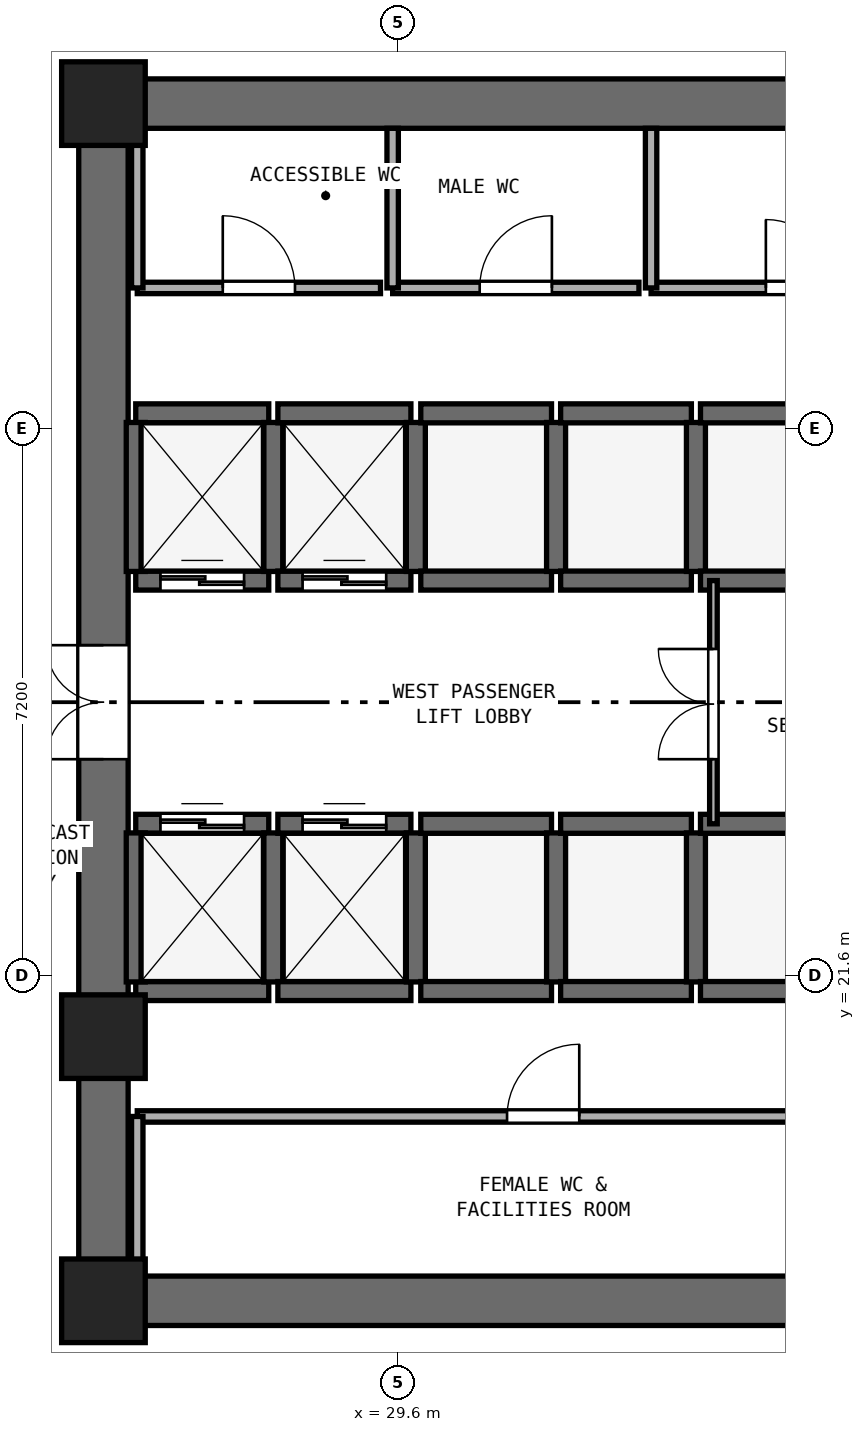
"""IFC4 building model, lengths in metres.
Left out: names, types, materials, properties, quantities, classifications, styles, units other than length and angle.
Written with IfcOpenShell. Run it as: python <this file> out.ifc"""

import sys

from ifc_helpers import new_model, si_unit, direction, frame, frame_2d, origin, origin_2d, place, context, subcontext, project, spatial, rectangle, extrude, element, fill, save


model = new_model("IFC4")
c1 = context("Model", 3, precision=1e-05, world=origin(), true_north=direction((0.0, 1.0)))
c2 = subcontext(c1, "Body", "Model", "MODEL_VIEW")
j1 = project(units=[si_unit("LENGTHUNIT", "METRE"), si_unit("PLANEANGLEUNIT", "RADIAN")], contexts=[c1])
p1 = place(None, origin())
s1 = spatial("IfcSite", under=j1, at=p1, CompositionType="ELEMENT")
p2 = place(p1, origin())
s2 = spatial("IfcBuilding", under=s1, at=p2, CompositionType="ELEMENT")
p3 = place(p2, frame((0.0, 0.0, 104.8)))
s3 = spatial("IfcBuildingStorey", under=s2, at=p3, CompositionType="ELEMENT", Elevation=104.8)
for number, where, z_axis, x_axis in (
    (1, (25.4, 17.325, 0.0), (0.0, 0.0, 1.0), (1.0, 0.0, 0.0)),
    (2, (25.4, 33.075, 0.0), (0.0, 0.0, 1.0), (1.0, 0.0, 0.0)),
):
    element("IfcWall", number, at=place(p3, frame(where, z_axis=z_axis, x_axis=x_axis)), inside=s3, PredefinedType="SHEAR", context=c2, shape_type="SweptSolid", body=[
        extrude(rectangle(XDim=23.2, YDim=0.65, at=frame_2d((11.6, 0.0))), origin(), (0.0, 0.0, 1.0), 3.525),
    ])
p4 = place(p3, frame((25.725, 17.65, 0.0), z_axis=(0.0, 0.0, 1.0), x_axis=(0.0, 1.0, 0.0)))
e3 = element("IfcWall", 3, at=p4, inside=s3, PredefinedType="SHEAR", context=c2, shape_type="SweptSolid", body=[
    extrude(rectangle(XDim=15.1, YDim=0.65, at=frame_2d((7.55, 0.0))), origin(), (0.0, 0.0, 1.0), 3.525),
])
p5 = place(p4, frame((6.8, 0.0, 0.0)))
e4 = element("IfcOpeningElement", 4, at=p5, cuts=e3, PredefinedType="OPENING", context=c2, shape_type="SweptSolid", body=[
    extrude(rectangle(XDim=1.5, YDim=2.15, at=frame_2d((0.75, 1.075))), frame((0.0, 0.335, 0.0), z_axis=(0.0, -1.0, 0.0), x_axis=(1.0, 0.0, 0.0)), (0.0, 0.0, 1.0), 0.67),
])
for number, where, z_axis, x_axis in (
    (5, (25.725, 17.325, 0.0), (0.0, 0.0, 1.0), (1.0, 0.0, 0.0)),
    (6, (25.725, 33.075, 0.0), (0.0, 0.0, 1.0), (1.0, 0.0, 0.0)),
    (7, (25.725, 20.8, 0.0), (0.0, 0.0, 1.0), (1.0, 0.0, 0.0)),
):
    element("IfcColumn", number, at=place(p3, frame(where, z_axis=z_axis, x_axis=x_axis)), inside=s3, PredefinedType="PILASTER", context=c2, shape_type="SweptSolid", body=[
        extrude(rectangle(XDim=1.1, YDim=1.1, at=origin_2d()), origin(), (0.0, 0.0, 1.0), 3.8),
    ])
p6 = place(p3, frame((26.15, 26.8, 0.0), z_axis=(0.0, 0.0, 1.0), x_axis=(1.0, 0.0, 0.0)))
e8 = element("IfcWall", 8, at=p6, inside=s3, PredefinedType="SHEAR", context=c2, shape_type="SweptSolid", body=[
    extrude(rectangle(XDim=1.75, YDim=0.25, at=frame_2d((0.875, 0.0))), origin(), (0.0, 0.0, 1.0), 3.525),
])
p7 = place(p6, frame((0.325, 0.0, 0.0)))
e9 = element("IfcOpeningElement", 9, at=p7, cuts=e8, PredefinedType="OPENING", context=c2, shape_type="SweptSolid", body=[
    extrude(rectangle(XDim=1.1, YDim=2.15, at=frame_2d((0.55, 1.075))), frame((0.0, 0.135, 0.0), z_axis=(0.0, -1.0, 0.0), x_axis=(1.0, 0.0, 0.0)), (0.0, 0.0, 1.0), 0.27),
])
p8 = place(p3, frame((26.15, 29.0, 0.0), z_axis=(0.0, 0.0, 1.0), x_axis=(1.0, 0.0, 0.0)))
e10 = element("IfcWall", 10, at=p8, inside=s3, PredefinedType="SHEAR", context=c2, shape_type="SweptSolid", body=[
    extrude(rectangle(XDim=1.75, YDim=0.25, at=frame_2d((0.875, 0.0))), origin(), (0.0, 0.0, 1.0), 3.525),
])
for number, where, z_axis, x_axis in (
    (11, (26.15, 26.92, 0.0), (0.0, 0.0, 1.0), (0.0, 1.0, 0.0)),
    (12, (27.96, 26.92, 0.0), (0.0, 0.0, 1.0), (0.0, 1.0, 0.0)),
):
    element("IfcWall", number, at=place(p3, frame(where, z_axis=z_axis, x_axis=x_axis)), inside=s3, PredefinedType="SHEAR", context=c2, shape_type="SweptSolid", body=[
        extrude(rectangle(XDim=1.96, YDim=0.25, at=frame_2d((0.98, 0.0))), origin(), (0.0, 0.0, 1.0), 3.525),
    ])
p9 = place(p3, frame((28.02, 26.8, 0.0), z_axis=(0.0, 0.0, 1.0), x_axis=(1.0, 0.0, 0.0)))
e13 = element("IfcWall", 13, at=p9, inside=s3, PredefinedType="SHEAR", context=c2, shape_type="SweptSolid", body=[
    extrude(rectangle(XDim=1.75, YDim=0.25, at=frame_2d((0.875, 0.0))), origin(), (0.0, 0.0, 1.0), 3.525),
])
p10 = place(p9, frame((0.325, 0.0, 0.0)))
e14 = element("IfcOpeningElement", 14, at=p10, cuts=e13, PredefinedType="OPENING", context=c2, shape_type="SweptSolid", body=[
    extrude(rectangle(XDim=1.1, YDim=2.15, at=frame_2d((0.55, 1.075))), frame((0.0, 0.135, 0.0), z_axis=(0.0, -1.0, 0.0), x_axis=(1.0, 0.0, 0.0)), (0.0, 0.0, 1.0), 0.27),
])
p11 = place(p3, frame((28.02, 29.0, 0.0), z_axis=(0.0, 0.0, 1.0), x_axis=(1.0, 0.0, 0.0)))
e15 = element("IfcWall", 15, at=p11, inside=s3, PredefinedType="SHEAR", context=c2, shape_type="SweptSolid", body=[
    extrude(rectangle(XDim=1.75, YDim=0.25, at=frame_2d((0.875, 0.0))), origin(), (0.0, 0.0, 1.0), 3.525),
])
p12 = place(p3, frame((29.835, 26.92, 0.0), z_axis=(0.0, 0.0, 1.0), x_axis=(0.0, 1.0, 0.0)))
e16 = element("IfcWall", 16, at=p12, inside=s3, PredefinedType="SHEAR", context=c2, shape_type="SweptSolid", body=[
    extrude(rectangle(XDim=1.96, YDim=0.25, at=frame_2d((0.98, 0.0))), origin(), (0.0, 0.0, 1.0), 3.525),
])
p13 = place(p3, frame((26.15, 21.4, 0.0), z_axis=(0.0, 0.0, 1.0), x_axis=(1.0, 0.0, 0.0)))
e17 = element("IfcWall", 17, at=p13, inside=s3, PredefinedType="SHEAR", context=c2, shape_type="SweptSolid", body=[
    extrude(rectangle(XDim=1.75, YDim=0.25, at=frame_2d((0.875, 0.0))), origin(), (0.0, 0.0, 1.0), 3.525),
])
p14 = place(p3, frame((26.15, 23.6, 0.0), z_axis=(0.0, 0.0, 1.0), x_axis=(1.0, 0.0, 0.0)))
e18 = element("IfcWall", 18, at=p14, inside=s3, PredefinedType="SHEAR", context=c2, shape_type="SweptSolid", body=[
    extrude(rectangle(XDim=1.75, YDim=0.25, at=frame_2d((0.875, 0.0))), origin(), (0.0, 0.0, 1.0), 3.525),
])
p15 = place(p14, frame((0.325, 0.0, 0.0)))
e19 = element("IfcOpeningElement", 19, at=p15, cuts=e18, PredefinedType="OPENING", context=c2, shape_type="SweptSolid", body=[
    extrude(rectangle(XDim=1.1, YDim=2.15, at=frame_2d((0.55, 1.075))), frame((0.0, 0.135, 0.0), z_axis=(0.0, -1.0, 0.0), x_axis=(1.0, 0.0, 0.0)), (0.0, 0.0, 1.0), 0.27),
])
for number, where, z_axis, x_axis in (
    (20, (26.15, 21.52, 0.0), (0.0, 0.0, 1.0), (0.0, 1.0, 0.0)),
    (21, (27.96, 21.52, 0.0), (0.0, 0.0, 1.0), (0.0, 1.0, 0.0)),
):
    element("IfcWall", number, at=place(p3, frame(where, z_axis=z_axis, x_axis=x_axis)), inside=s3, PredefinedType="SHEAR", context=c2, shape_type="SweptSolid", body=[
        extrude(rectangle(XDim=1.96, YDim=0.25, at=frame_2d((0.98, 0.0))), origin(), (0.0, 0.0, 1.0), 3.525),
    ])
p16 = place(p3, frame((28.02, 21.4, 0.0), z_axis=(0.0, 0.0, 1.0), x_axis=(1.0, 0.0, 0.0)))
e22 = element("IfcWall", 22, at=p16, inside=s3, PredefinedType="SHEAR", context=c2, shape_type="SweptSolid", body=[
    extrude(rectangle(XDim=1.75, YDim=0.25, at=frame_2d((0.875, 0.0))), origin(), (0.0, 0.0, 1.0), 3.525),
])
p17 = place(p3, frame((28.02, 23.6, 0.0), z_axis=(0.0, 0.0, 1.0), x_axis=(1.0, 0.0, 0.0)))
e23 = element("IfcWall", 23, at=p17, inside=s3, PredefinedType="SHEAR", context=c2, shape_type="SweptSolid", body=[
    extrude(rectangle(XDim=1.75, YDim=0.25, at=frame_2d((0.875, 0.0))), origin(), (0.0, 0.0, 1.0), 3.525),
])
p18 = place(p17, frame((0.325, 0.0, 0.0)))
e24 = element("IfcOpeningElement", 24, at=p18, cuts=e23, PredefinedType="OPENING", context=c2, shape_type="SweptSolid", body=[
    extrude(rectangle(XDim=1.1, YDim=2.15, at=frame_2d((0.55, 1.075))), frame((0.0, 0.135, 0.0), z_axis=(0.0, -1.0, 0.0), x_axis=(1.0, 0.0, 0.0)), (0.0, 0.0, 1.0), 0.27),
])
p19 = place(p3, frame((29.835, 21.52, 0.0), z_axis=(0.0, 0.0, 1.0), x_axis=(0.0, 1.0, 0.0)))
e25 = element("IfcWall", 25, at=p19, inside=s3, PredefinedType="SHEAR", context=c2, shape_type="SweptSolid", body=[
    extrude(rectangle(XDim=1.96, YDim=0.25, at=frame_2d((0.98, 0.0))), origin(), (0.0, 0.0, 1.0), 3.525),
])
for number, where, z_axis, x_axis in (
    (26, (29.9, 21.4, 0.0), (0.0, 0.0, 1.0), (1.0, 0.0, 0.0)),
    (27, (29.9, 23.6, 0.0), (0.0, 0.0, 1.0), (1.0, 0.0, 0.0)),
):
    element("IfcWall", number, at=place(p3, frame(where, z_axis=z_axis, x_axis=x_axis)), inside=s3, PredefinedType="SHEAR", context=c2, shape_type="SweptSolid", body=[
        extrude(rectangle(XDim=1.72, YDim=0.25, at=frame_2d((0.86, 0.0))), origin(), (0.0, 0.0, 1.0), 3.525),
    ])
p20 = place(p3, frame((31.68, 21.52, 0.0), z_axis=(0.0, 0.0, 1.0), x_axis=(0.0, 1.0, 0.0)))
e28 = element("IfcWall", 28, at=p20, inside=s3, PredefinedType="SHEAR", context=c2, shape_type="SweptSolid", body=[
    extrude(rectangle(XDim=1.96, YDim=0.25, at=frame_2d((0.98, 0.0))), origin(), (0.0, 0.0, 1.0), 3.525),
])
for number, where, z_axis, x_axis in (
    (29, (31.74, 21.4, 0.0), (0.0, 0.0, 1.0), (1.0, 0.0, 0.0)),
    (30, (31.74, 23.6, 0.0), (0.0, 0.0, 1.0), (1.0, 0.0, 0.0)),
):
    element("IfcWall", number, at=place(p3, frame(where, z_axis=z_axis, x_axis=x_axis)), inside=s3, PredefinedType="SHEAR", context=c2, shape_type="SweptSolid", body=[
        extrude(rectangle(XDim=1.72, YDim=0.25, at=frame_2d((0.86, 0.0))), origin(), (0.0, 0.0, 1.0), 3.525),
    ])
p21 = place(p3, frame((33.52, 21.52, 0.0), z_axis=(0.0, 0.0, 1.0), x_axis=(0.0, 1.0, 0.0)))
e31 = element("IfcWall", 31, at=p21, inside=s3, PredefinedType="SHEAR", context=c2, shape_type="SweptSolid", body=[
    extrude(rectangle(XDim=1.96, YDim=0.25, at=frame_2d((0.98, 0.0))), origin(), (0.0, 0.0, 1.0), 3.525),
])
for number, where, z_axis, x_axis in (
    (32, (33.58, 21.4, 0.0), (0.0, 0.0, 1.0), (1.0, 0.0, 0.0)),
    (33, (33.58, 23.6, 0.0), (0.0, 0.0, 1.0), (1.0, 0.0, 0.0)),
):
    element("IfcWall", number, at=place(p3, frame(where, z_axis=z_axis, x_axis=x_axis)), inside=s3, PredefinedType="SHEAR", context=c2, shape_type="SweptSolid", body=[
        extrude(rectangle(XDim=1.72, YDim=0.25, at=frame_2d((0.86, 0.0))), origin(), (0.0, 0.0, 1.0), 3.525),
    ])
for number, where, z_axis, x_axis in (
    (34, (29.9, 26.8, 0.0), (0.0, 0.0, 1.0), (1.0, 0.0, 0.0)),
    (35, (29.9, 29.0, 0.0), (0.0, 0.0, 1.0), (1.0, 0.0, 0.0)),
):
    element("IfcWall", number, at=place(p3, frame(where, z_axis=z_axis, x_axis=x_axis)), inside=s3, PredefinedType="SHEAR", context=c2, shape_type="SweptSolid", body=[
        extrude(rectangle(XDim=1.72, YDim=0.25, at=frame_2d((0.86, 0.0))), origin(), (0.0, 0.0, 1.0), 3.525),
    ])
p22 = place(p3, frame((31.68, 26.92, 0.0), z_axis=(0.0, 0.0, 1.0), x_axis=(0.0, 1.0, 0.0)))
e36 = element("IfcWall", 36, at=p22, inside=s3, PredefinedType="SHEAR", context=c2, shape_type="SweptSolid", body=[
    extrude(rectangle(XDim=1.96, YDim=0.25, at=frame_2d((0.98, 0.0))), origin(), (0.0, 0.0, 1.0), 3.525),
])
for number, where, z_axis, x_axis in (
    (37, (31.74, 26.8, 0.0), (0.0, 0.0, 1.0), (1.0, 0.0, 0.0)),
    (38, (31.74, 29.0, 0.0), (0.0, 0.0, 1.0), (1.0, 0.0, 0.0)),
):
    element("IfcWall", number, at=place(p3, frame(where, z_axis=z_axis, x_axis=x_axis)), inside=s3, PredefinedType="SHEAR", context=c2, shape_type="SweptSolid", body=[
        extrude(rectangle(XDim=1.72, YDim=0.25, at=frame_2d((0.86, 0.0))), origin(), (0.0, 0.0, 1.0), 3.525),
    ])
p23 = place(p3, frame((33.52, 26.92, 0.0), z_axis=(0.0, 0.0, 1.0), x_axis=(0.0, 1.0, 0.0)))
e39 = element("IfcWall", 39, at=p23, inside=s3, PredefinedType="SHEAR", context=c2, shape_type="SweptSolid", body=[
    extrude(rectangle(XDim=1.96, YDim=0.25, at=frame_2d((0.98, 0.0))), origin(), (0.0, 0.0, 1.0), 3.525),
])
for number, where, z_axis, x_axis in (
    (40, (33.58, 26.8, 0.0), (0.0, 0.0, 1.0), (1.0, 0.0, 0.0)),
    (41, (33.58, 29.0, 0.0), (0.0, 0.0, 1.0), (1.0, 0.0, 0.0)),
):
    element("IfcWall", number, at=place(p3, frame(where, z_axis=z_axis, x_axis=x_axis)), inside=s3, PredefinedType="SHEAR", context=c2, shape_type="SweptSolid", body=[
        extrude(rectangle(XDim=1.72, YDim=0.25, at=frame_2d((0.86, 0.0))), origin(), (0.0, 0.0, 1.0), 3.525),
    ])
p24 = place(p3, frame((26.17, 30.65, 0.0), z_axis=(0.0, 0.0, 1.0), x_axis=(1.0, 0.0, 0.0)))
e42 = element("IfcWall", 42, at=p24, inside=s3, PredefinedType="PARTITIONING", context=c2, shape_type="SweptSolid", body=[
    extrude(rectangle(XDim=3.2, YDim=0.15, at=frame_2d((1.6, 0.0))), origin(), (0.0, 0.0, 1.0), 3.525),
])
p25 = place(p24, frame((1.125, 0.0, 0.0)))
e43 = element("IfcOpeningElement", 43, at=p25, cuts=e42, PredefinedType="OPENING", context=c2, shape_type="SweptSolid", body=[
    extrude(rectangle(XDim=0.95, YDim=2.1, at=frame_2d((0.475, 1.05))), frame((0.0, 0.085, 0.0), z_axis=(0.0, -1.0, 0.0), x_axis=(1.0, 0.0, 0.0)), (0.0, 0.0, 1.0), 0.17),
])
p26 = place(p3, frame((26.17, 30.65, 0.0), z_axis=(0.0, 0.0, 1.0), x_axis=(0.0, 1.0, 0.0)))
e44 = element("IfcWall", 44, at=p26, inside=s3, PredefinedType="PARTITIONING", context=c2, shape_type="SweptSolid", body=[
    extrude(rectangle(XDim=2.1, YDim=0.15, at=frame_2d((1.05, 0.0))), origin(), (0.0, 0.0, 1.0), 3.525),
])
p27 = place(p3, frame((29.53, 30.65, 0.0), z_axis=(0.0, 0.0, 1.0), x_axis=(1.0, 0.0, 0.0)))
e45 = element("IfcWall", 45, at=p27, inside=s3, PredefinedType="PARTITIONING", context=c2, shape_type="SweptSolid", body=[
    extrude(rectangle(XDim=3.24, YDim=0.15, at=frame_2d((1.62, 0.0))), origin(), (0.0, 0.0, 1.0), 3.525),
])
p28 = place(p27, frame((1.145, 0.0, 0.0)))
e46 = element("IfcOpeningElement", 46, at=p28, cuts=e45, PredefinedType="OPENING", context=c2, shape_type="SweptSolid", body=[
    extrude(rectangle(XDim=0.95, YDim=2.1, at=frame_2d((0.475, 1.05))), frame((0.0, 0.085, 0.0), z_axis=(0.0, -1.0, 0.0), x_axis=(1.0, 0.0, 0.0)), (0.0, 0.0, 1.0), 0.17),
])
p29 = place(p3, frame((29.53, 30.65, 0.0), z_axis=(0.0, 0.0, 1.0), x_axis=(0.0, 1.0, 0.0)))
e47 = element("IfcWall", 47, at=p29, inside=s3, PredefinedType="PARTITIONING", context=c2, shape_type="SweptSolid", body=[
    extrude(rectangle(XDim=2.1, YDim=0.15, at=frame_2d((1.05, 0.0))), origin(), (0.0, 0.0, 1.0), 3.525),
])
p30 = place(p3, frame((32.93, 30.65, 0.0), z_axis=(0.0, 0.0, 1.0), x_axis=(1.0, 0.0, 0.0)))
e48 = element("IfcWall", 48, at=p30, inside=s3, PredefinedType="PARTITIONING", context=c2, shape_type="SweptSolid", body=[
    extrude(rectangle(XDim=3.92, YDim=0.15, at=frame_2d((1.96, 0.0))), origin(), (0.0, 0.0, 1.0), 3.525),
])
p31 = place(p30, frame((1.51, 0.0, 0.0)))
e49 = element("IfcOpeningElement", 49, at=p31, cuts=e48, PredefinedType="OPENING", context=c2, shape_type="SweptSolid", body=[
    extrude(rectangle(XDim=0.9, YDim=2.1, at=frame_2d((0.45, 1.05))), frame((0.0, 0.085, 0.0), z_axis=(0.0, -1.0, 0.0), x_axis=(1.0, 0.0, 0.0)), (0.0, 0.0, 1.0), 0.17),
])
p32 = place(p3, frame((32.93, 30.65, 0.0), z_axis=(0.0, 0.0, 1.0), x_axis=(0.0, 1.0, 0.0)))
e50 = element("IfcWall", 50, at=p32, inside=s3, PredefinedType="PARTITIONING", context=c2, shape_type="SweptSolid", body=[
    extrude(rectangle(XDim=2.1, YDim=0.15, at=frame_2d((1.05, 0.0))), origin(), (0.0, 0.0, 1.0), 3.525),
])
p33 = place(p3, frame((26.17, 19.75, 0.0), z_axis=(0.0, 0.0, 1.0), x_axis=(1.0, 0.0, 0.0)))
e51 = element("IfcWall", 51, at=p33, inside=s3, PredefinedType="PARTITIONING", context=c2, shape_type="SweptSolid", body=[
    extrude(rectangle(XDim=10.68, YDim=0.15, at=frame_2d((5.34, 0.0))), origin(), (0.0, 0.0, 1.0), 3.525),
])
p34 = place(p33, frame((4.865, 0.0, 0.0)))
e52 = element("IfcOpeningElement", 52, at=p34, cuts=e51, PredefinedType="OPENING", context=c2, shape_type="SweptSolid", body=[
    extrude(rectangle(XDim=0.95, YDim=2.1, at=frame_2d((0.475, 1.05))), frame((0.0, 0.085, 0.0), z_axis=(0.0, -1.0, 0.0), x_axis=(1.0, 0.0, 0.0)), (0.0, 0.0, 1.0), 0.17),
])
p35 = place(p3, frame((26.17, 17.65, 0.0), z_axis=(0.0, 0.0, 1.0), x_axis=(0.0, 1.0, 0.0)))
e53 = element("IfcWall", 53, at=p35, inside=s3, PredefinedType="PARTITIONING", context=c2, shape_type="SweptSolid", body=[
    extrude(rectangle(XDim=2.1, YDim=0.15, at=frame_2d((1.05, 0.0))), origin(), (0.0, 0.0, 1.0), 3.525),
])
p36 = place(p3, frame((33.75, 23.6, 0.0), z_axis=(0.0, 0.0, 1.0), x_axis=(0.0, 1.0, 0.0)))
e54 = element("IfcWall", 54, at=p36, inside=s3, PredefinedType="PARTITIONING", context=c2, shape_type="SweptSolid", body=[
    extrude(rectangle(XDim=3.2, YDim=0.1, at=frame_2d((1.6, 0.0))), origin(), (0.0, 0.0, 1.0), 3.525),
])
p37 = place(p36, frame((0.85, 0.0, 0.0)))
e55 = element("IfcOpeningElement", 55, at=p37, cuts=e54, PredefinedType="OPENING", context=c2, shape_type="SweptSolid", body=[
    extrude(rectangle(XDim=1.45, YDim=2.12, at=frame_2d((0.725, 1.06))), frame((0.0, 0.06, 0.0), z_axis=(0.0, -1.0, 0.0), x_axis=(1.0, 0.0, 0.0)), (0.0, 0.0, 1.0), 0.12),
])
p38 = place(p7, origin())
e56 = element("IfcDoor", 56, at=p38, inside=s3, OperationType="DOUBLE_DOOR_SLIDING", PredefinedType="DOOR", context=c2, shape_type="SweptSolid", body=[
    extrude(rectangle(XDim=1.1, YDim=2.15, at=frame_2d((0.55, 1.075))), frame((0.0, 0.025, 0.0), z_axis=(0.0, -1.0, 0.0), x_axis=(1.0, 0.0, 0.0)), (0.0, 0.0, 1.0), 0.05),
])
fill(e9, e56)
p39 = place(p10, origin())
e57 = element("IfcDoor", 57, at=p39, inside=s3, OperationType="DOUBLE_DOOR_SLIDING", PredefinedType="DOOR", context=c2, shape_type="SweptSolid", body=[
    extrude(rectangle(XDim=1.1, YDim=2.15, at=frame_2d((0.55, 1.075))), frame((0.0, 0.025, 0.0), z_axis=(0.0, -1.0, 0.0), x_axis=(1.0, 0.0, 0.0)), (0.0, 0.0, 1.0), 0.05),
])
fill(e14, e57)
p40 = place(p15, origin())
e58 = element("IfcDoor", 58, at=p40, inside=s3, OperationType="DOUBLE_DOOR_SLIDING", PredefinedType="DOOR", context=c2, shape_type="SweptSolid", body=[
    extrude(rectangle(XDim=1.1, YDim=2.15, at=frame_2d((0.55, 1.075))), frame((0.0, 0.025, 0.0), z_axis=(0.0, -1.0, 0.0), x_axis=(1.0, 0.0, 0.0)), (0.0, 0.0, 1.0), 0.05),
])
fill(e19, e58)
p41 = place(p18, origin())
e59 = element("IfcDoor", 59, at=p41, inside=s3, OperationType="DOUBLE_DOOR_SLIDING", PredefinedType="DOOR", context=c2, shape_type="SweptSolid", body=[
    extrude(rectangle(XDim=1.1, YDim=2.15, at=frame_2d((0.55, 1.075))), frame((0.0, 0.025, 0.0), z_axis=(0.0, -1.0, 0.0), x_axis=(1.0, 0.0, 0.0)), (0.0, 0.0, 1.0), 0.05),
])
fill(e24, e59)
p42 = place(p5, origin())
e60 = element("IfcDoor", 60, at=p42, inside=s3, OperationType="DOUBLE_DOOR_SINGLE_SWING", PredefinedType="DOOR", context=c2, shape_type="SweptSolid", body=[
    extrude(rectangle(XDim=1.5, YDim=2.15, at=frame_2d((0.75, 1.075))), frame((0.0, 0.025, 0.0), z_axis=(0.0, -1.0, 0.0), x_axis=(1.0, 0.0, 0.0)), (0.0, 0.0, 1.0), 0.05),
])
fill(e4, e60)
p43 = place(p25, origin())
e61 = element("IfcDoor", 61, at=p43, inside=s3, OperationType="SINGLE_SWING_LEFT", PredefinedType="DOOR", context=c2, shape_type="SweptSolid", body=[
    extrude(rectangle(XDim=0.95, YDim=2.1, at=frame_2d((0.475, 1.05))), frame((0.0, 0.025, 0.0), z_axis=(0.0, -1.0, 0.0), x_axis=(1.0, 0.0, 0.0)), (0.0, 0.0, 1.0), 0.05),
])
fill(e43, e61)
p44 = place(p28, origin())
e62 = element("IfcDoor", 62, at=p44, inside=s3, OperationType="SINGLE_SWING_RIGHT", PredefinedType="DOOR", context=c2, shape_type="SweptSolid", body=[
    extrude(rectangle(XDim=0.95, YDim=2.1, at=frame_2d((0.475, 1.05))), frame((0.0, 0.025, 0.0), z_axis=(0.0, -1.0, 0.0), x_axis=(1.0, 0.0, 0.0)), (0.0, 0.0, 1.0), 0.05),
])
fill(e46, e62)
p45 = place(p31, origin())
e63 = element("IfcDoor", 63, at=p45, inside=s3, OperationType="SINGLE_SWING_LEFT", PredefinedType="DOOR", context=c2, shape_type="SweptSolid", body=[
    extrude(rectangle(XDim=0.9, YDim=2.1, at=frame_2d((0.45, 1.05))), frame((0.0, 0.025, 0.0), z_axis=(0.0, -1.0, 0.0), x_axis=(1.0, 0.0, 0.0)), (0.0, 0.0, 1.0), 0.05),
])
fill(e49, e63)
p46 = place(p34, origin())
e64 = element("IfcDoor", 64, at=p46, inside=s3, OperationType="SINGLE_SWING_RIGHT", PredefinedType="DOOR", context=c2, shape_type="SweptSolid", body=[
    extrude(rectangle(XDim=0.95, YDim=2.1, at=frame_2d((0.475, 1.05))), frame((0.0, 0.025, 0.0), z_axis=(0.0, -1.0, 0.0), x_axis=(1.0, 0.0, 0.0)), (0.0, 0.0, 1.0), 0.05),
])
fill(e52, e64)
p47 = place(p37, origin())
e65 = element("IfcDoor", 65, at=p47, inside=s3, OperationType="DOUBLE_DOOR_SINGLE_SWING", PredefinedType="DOOR", context=c2, shape_type="SweptSolid", body=[
    extrude(rectangle(XDim=1.45, YDim=2.12, at=frame_2d((0.725, 1.06))), frame((0.0, 0.025, 0.0), z_axis=(0.0, -1.0, 0.0), x_axis=(1.0, 0.0, 0.0)), (0.0, 0.0, 1.0), 0.05),
])
fill(e55, e65)
save(model, sys.argv[1])
